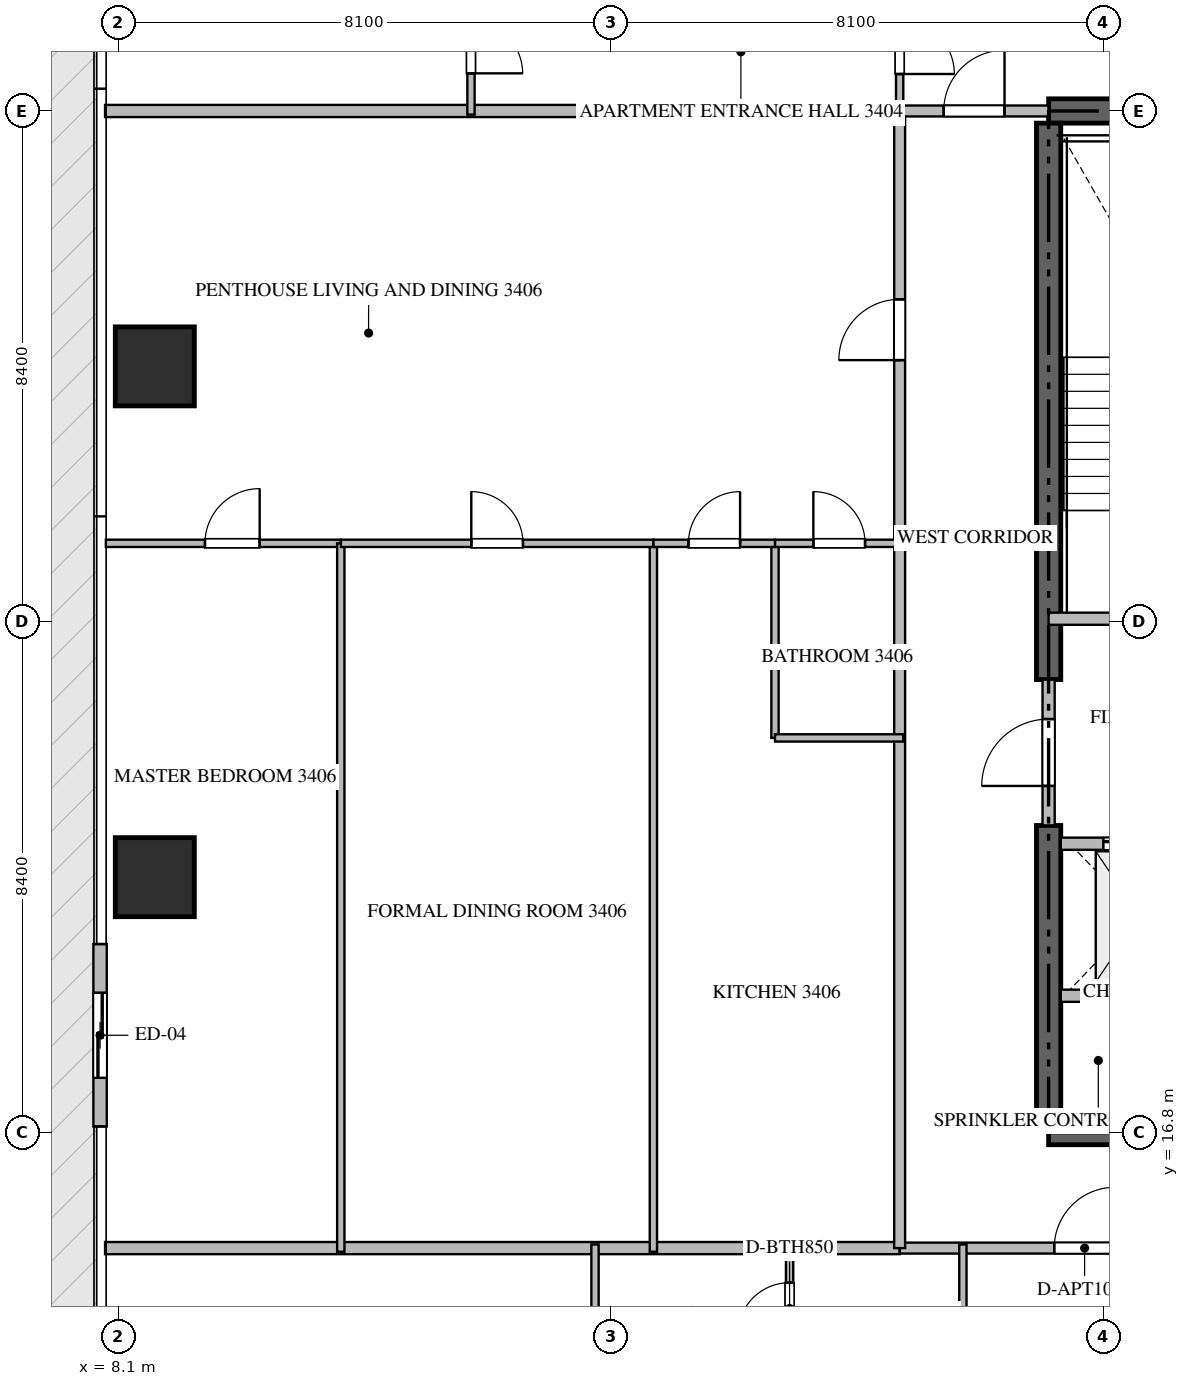
"""IFC4 building model, lengths in metres.
Left out: names, types, materials, properties, quantities, classifications, styles, units other than length and angle.
Written with IfcOpenShell. Run it as: python <this file> out.ifc"""

import sys

from ifc_helpers import new_model, si_unit, direction, frame, frame_2d, origin, origin_2d, place, context, subcontext, project, spatial, rectangle, extrude, source, transform, mapped, element, fill, save


model = new_model("IFC4")
c1 = context("Model", 3, precision=1e-05, world=origin(), true_north=direction((0.0, 1.0)))
c2 = subcontext(c1, "Body", "Model", "MODEL_VIEW")
j1 = project(units=[si_unit("LENGTHUNIT", "METRE"), si_unit("PLANEANGLEUNIT", "RADIAN")], contexts=[c1])
p1 = place(None, origin())
s1 = spatial("IfcSite", under=j1, at=p1, CompositionType="ELEMENT")
p2 = place(p1, origin())
s2 = spatial("IfcBuilding", under=s1, at=p2, CompositionType="ELEMENT")
p3 = place(p2, frame((0.0, 0.0, 138.9)))
s3 = spatial("IfcBuildingStorey", under=s2, at=p3, CompositionType="ELEMENT", Elevation=138.9)
for number, where, z_axis, x_axis in (
    (1, (23.4, 16.8, -0.26), (0.0, 0.0, 1.0), (1.0, 0.0, 0.0)),
    (2, (41.4, 33.6, -0.26), (0.0, 0.0, 1.0), (-1.0, 0.0, 0.0)),
):
    element("IfcWall", number, at=place(p3, frame(where, z_axis=z_axis, x_axis=x_axis)), inside=s3, PredefinedType="SHEAR", context=c2, shape_type="SweptSolid", body=[
        extrude(rectangle(XDim=18.0, YDim=0.4, at=frame_2d((9.0, 0.0))), origin(), (0.0, 0.0, 1.0), 3.748),
    ])
p4 = place(p3, frame((23.4, 17.0, -0.26), z_axis=(0.0, 0.0, 1.0), x_axis=(0.0, 1.0, 0.0)))
e3 = element("IfcWall", 3, at=p4, inside=s3, PredefinedType="SHEAR", context=c2, shape_type="SweptSolid", body=[
    extrude(rectangle(XDim=4.85, YDim=0.4, at=frame_2d((2.425, 0.0))), origin(), (0.0, 0.0, 1.0), 3.748),
])
p5 = place(p3, frame((23.4, 24.25, -0.26), z_axis=(0.0, 0.0, 1.0), x_axis=(0.0, 1.0, 0.0)))
e4 = element("IfcWall", 4, at=p5, inside=s3, PredefinedType="SHEAR", context=c2, shape_type="SweptSolid", body=[
    extrude(rectangle(XDim=9.15, YDim=0.4, at=frame_2d((4.575, 0.0))), origin(), (0.0, 0.0, 1.0), 3.748),
])
m1 = source(origin(), c2, "Body", "SweptSolid", [
    extrude(rectangle(XDim=1.3, YDim=1.3, at=origin_2d()), origin(), (0.0, 0.0, 1.0), 3.75),
])
for number, where, z_axis, x_axis in (
    (5, (8.7, 21.0, -0.26), (0.0, 0.0, 1.0), (1.0, 0.0, 0.0)),
    (6, (8.7, 29.4, -0.26), (0.0, 0.0, 1.0), (1.0, 0.0, 0.0)),
):
    element("IfcColumn", number, at=place(p3, frame(where, z_axis=z_axis, x_axis=x_axis)), inside=s3, PredefinedType="COLUMN", context=c2, shape_type="MappedRepresentation", body=[
        mapped(m1, transform((0.0, 0.0, 0.0), scale=1.0)),
    ])
p6 = place(p3, frame((7.8, 19.9, 0.0), z_axis=(0.0, 0.0, 1.0), x_axis=(0.0, -1.0, 0.0)))
e7 = element("IfcWall", 7, at=p6, inside=s3, PredefinedType="ELEMENTEDWALL", context=c2, shape_type="SweptSolid", body=[
    extrude(rectangle(XDim=3.0, YDim=0.22, at=frame_2d((1.5, 0.0))), origin(), (0.0, 0.0, 1.0), 3.475),
])
p7 = place(p6, frame((0.8, 0.0, 0.0)))
e8 = element("IfcOpeningElement", 8, at=p7, cuts=e7, PredefinedType="OPENING", context=c2, shape_type="SweptSolid", body=[
    extrude(rectangle(XDim=1.4, YDim=2.25, at=frame_2d((0.7, 1.125))), frame((0.0, 0.12, 0.0), z_axis=(0.0, -1.0, 0.0), x_axis=(1.0, 0.0, 0.0)), (0.0, 0.0, 1.0), 0.24),
])
p8 = place(p3, frame((23.4, 25.25, 0.0), z_axis=(0.0, 0.0, 1.0), x_axis=(1.0, 0.0, 0.0)))
e9 = element("IfcWall", 9, at=p8, inside=s3, PredefinedType="STANDARD", context=c2, shape_type="SweptSolid", body=[
    extrude(rectangle(XDim=4.45, YDim=0.2, at=frame_2d((2.225, 0.0))), origin(), (0.0, 0.0, 1.0), 3.49),
])
p9 = place(p8, frame((1.65, 0.0, 0.0)))
e10 = element("IfcOpeningElement", 10, at=p9, cuts=e9, PredefinedType="OPENING", context=c2, shape_type="SweptSolid", body=[
    extrude(rectangle(XDim=1.1, YDim=2.15, at=frame_2d((0.55, 1.075))), frame((0.0, 0.11, 0.0), z_axis=(0.0, -1.0, 0.0), x_axis=(1.0, 0.0, 0.0)), (0.0, 0.0, 1.0), 0.22),
])
p10 = place(p3, frame((23.6, 21.55, 0.0), z_axis=(0.0, 0.0, 1.0), x_axis=(1.0, 0.0, 0.0)))
e11 = element("IfcWall", 11, at=p10, inside=s3, PredefinedType="STANDARD", context=c2, shape_type="SweptSolid", body=[
    extrude(rectangle(XDim=2.45, YDim=0.2, at=frame_2d((1.225, 0.0))), origin(), (0.0, 0.0, 1.0), 3.49),
])
p11 = place(p10, frame((0.7, 0.0, 0.0)))
e12 = element("IfcOpeningElement", 12, at=p11, cuts=e11, PredefinedType="OPENING", context=c2, shape_type="SweptSolid", body=[
    extrude(rectangle(XDim=1.2, YDim=2.2, at=frame_2d((0.6, 1.1))), frame((0.0, 0.11, 0.0), z_axis=(0.0, -1.0, 0.0), x_axis=(1.0, 0.0, 0.0)), (0.0, 0.0, 1.0), 0.22),
])
p12 = place(p3, frame((23.6, 19.05, 0.0), z_axis=(0.0, 0.0, 1.0), x_axis=(1.0, 0.0, 0.0)))
e13 = element("IfcWall", 13, at=p12, inside=s3, PredefinedType="STANDARD", context=c2, shape_type="SweptSolid", body=[
    extrude(rectangle(XDim=2.45, YDim=0.2, at=frame_2d((1.225, 0.0))), origin(), (0.0, 0.0, 1.0), 3.49),
])
p13 = place(p3, frame((23.4, 21.852, 0.0), z_axis=(0.0, 0.0, 1.0), x_axis=(0.0, 1.0, 0.0)))
e14 = element("IfcWall", 14, at=p13, inside=s3, PredefinedType="STANDARD", context=c2, shape_type="SweptSolid", body=[
    extrude(rectangle(XDim=2.396, YDim=0.2, at=frame_2d((1.198, 0.0))), origin(), (0.0, 0.0, 1.0), 3.49),
])
p14 = place(p13, frame((0.648, 0.0, 0.0)))
e15 = element("IfcOpeningElement", 15, at=p14, cuts=e14, PredefinedType="OPENING", context=c2, shape_type="SweptSolid", body=[
    extrude(rectangle(XDim=1.1, YDim=2.15, at=frame_2d((0.55, 1.075))), frame((0.0, 0.11, 0.0), z_axis=(0.0, -1.0, 0.0), x_axis=(1.0, 0.0, 0.0)), (0.0, 0.0, 1.0), 0.22),
])
for number, where, z_axis, x_axis in (
    (16, (7.882, 14.9, 0.0), (0.0, 0.0, 1.0), (1.0, 0.0, 0.0)),
    (17, (7.882, 33.6, 0.0), (0.0, 0.0, 1.0), (1.0, 0.0, 0.0)),
):
    element("IfcWall", number, at=place(p3, frame(where, z_axis=z_axis, x_axis=x_axis)), inside=s3, PredefinedType="PARTITIONING", context=c2, shape_type="SweptSolid", body=[
        extrude(rectangle(XDim=13.068, YDim=0.2, at=frame_2d((6.534, 0.0))), origin(), (0.0, 0.0, 1.0), 3.49),
    ])
p15 = place(p3, frame((20.952, 14.9, 0.0), z_axis=(0.0, 0.0, 1.0), x_axis=(1.0, 0.0, 0.0)))
e18 = element("IfcWall", 18, at=p15, inside=s3, PredefinedType="PARTITIONING", context=c2, shape_type="SweptSolid", body=[
    extrude(rectangle(XDim=22.896, YDim=0.18, at=frame_2d((11.448, 0.0))), origin(), (0.0, 0.0, 1.0), 3.49),
])
p16 = place(p15, frame((2.54, 0.0, 0.0)))
e19 = element("IfcOpeningElement", 19, at=p16, cuts=e18, PredefinedType="OPENING", context=c2, shape_type="SweptSolid", body=[
    extrude(rectangle(XDim=1.0, YDim=2.15, at=frame_2d((0.5, 1.075))), frame((0.0, 0.1, 0.0), z_axis=(0.0, -1.0, 0.0), x_axis=(1.0, 0.0, 0.0)), (0.0, 0.0, 1.0), 0.2),
])
p17 = place(p15, frame((14.911, 0.0, 0.0)))
e20 = element("IfcOpeningElement", 20, at=p17, cuts=e18, PredefinedType="OPENING", context=c2, shape_type="SweptSolid", body=[
    extrude(rectangle(XDim=1.0, YDim=2.15, at=frame_2d((0.5, 1.075))), frame((0.0, 0.1, 0.0), z_axis=(0.0, -1.0, 0.0), x_axis=(1.0, 0.0, 0.0)), (0.0, 0.0, 1.0), 0.2),
])
p18 = place(p15, frame((19.356, 0.0, 0.0)))
e21 = element("IfcOpeningElement", 21, at=p18, cuts=e18, PredefinedType="OPENING", context=c2, shape_type="SweptSolid", body=[
    extrude(rectangle(XDim=1.0, YDim=2.15, at=frame_2d((0.5, 1.075))), frame((0.0, 0.1, 0.0), z_axis=(0.0, -1.0, 0.0), x_axis=(1.0, 0.0, 0.0)), (0.0, 0.0, 1.0), 0.2),
])
p19 = place(p3, frame((20.95, 14.9, 0.0), z_axis=(0.0, 0.0, 1.0), x_axis=(0.0, 1.0, 0.0)))
e22 = element("IfcWall", 22, at=p19, inside=s3, PredefinedType="PARTITIONING", context=c2, shape_type="SweptSolid", body=[
    extrude(rectangle(XDim=18.7, YDim=0.18, at=frame_2d((9.35, 0.0))), origin(), (0.0, 0.0, 1.0), 3.49),
])
p20 = place(p19, frame((14.603, 0.0, 0.0)))
e23 = element("IfcOpeningElement", 23, at=p20, cuts=e22, PredefinedType="OPENING", context=c2, shape_type="SweptSolid", body=[
    extrude(rectangle(XDim=1.0, YDim=2.15, at=frame_2d((0.5, 1.075))), frame((0.0, 0.1, 0.0), z_axis=(0.0, -1.0, 0.0), x_axis=(1.0, 0.0, 0.0)), (0.0, 0.0, 1.0), 0.2),
])
p21 = place(p3, frame((20.952, 33.6, 0.0), z_axis=(0.0, 0.0, 1.0), x_axis=(1.0, 0.0, 0.0)))
e24 = element("IfcWall", 24, at=p21, inside=s3, PredefinedType="PARTITIONING", context=c2, shape_type="SweptSolid", body=[
    extrude(rectangle(XDim=2.446, YDim=0.18, at=frame_2d((1.223, 0.0))), origin(), (0.0, 0.0, 1.0), 3.49),
])
p22 = place(p21, frame((0.723, 0.0, 0.0)))
e25 = element("IfcOpeningElement", 25, at=p22, cuts=e24, PredefinedType="OPENING", context=c2, shape_type="SweptSolid", body=[
    extrude(rectangle(XDim=1.0, YDim=2.15, at=frame_2d((0.5, 1.075))), frame((0.0, 0.1, 0.0), z_axis=(0.0, -1.0, 0.0), x_axis=(1.0, 0.0, 0.0)), (0.0, 0.0, 1.0), 0.2),
])
p23 = place(p3, frame((21.99, 12.15, 0.0), z_axis=(0.0, 0.0, 1.0), x_axis=(0.0, 1.0, 0.0)))
e26 = element("IfcWall", 26, at=p23, inside=s3, PredefinedType="PARTITIONING", context=c2, shape_type="SweptSolid", body=[
    extrude(rectangle(XDim=2.81, YDim=0.12, at=frame_2d((1.405, 0.0))), origin(), (0.0, 0.0, 1.0), 3.49),
])
p24 = place(p3, frame((15.94, 12.85, 0.0), z_axis=(0.0, 0.0, 1.0), x_axis=(0.0, 1.0, 0.0)))
e27 = element("IfcWall", 27, at=p24, inside=s3, PredefinedType="PARTITIONING", context=c2, shape_type="SweptSolid", body=[
    extrude(rectangle(XDim=2.11, YDim=0.12, at=frame_2d((1.055, 0.0))), origin(), (0.0, 0.0, 1.0), 3.49),
])
p25 = place(p3, frame((19.14, 12.852, 0.0), z_axis=(0.0, 0.0, 1.0), x_axis=(0.0, 1.0, 0.0)))
e28 = element("IfcWall", 28, at=p25, inside=s3, PredefinedType="PARTITIONING", context=c2, shape_type="SweptSolid", body=[
    extrude(rectangle(XDim=2.108, YDim=0.12, at=frame_2d((1.054, 0.0))), origin(), (0.0, 0.0, 1.0), 3.49),
])
p26 = place(p25, frame((0.629, 0.0, 0.0)))
e29 = element("IfcOpeningElement", 29, at=p26, cuts=e28, PredefinedType="OPENING", context=c2, shape_type="SweptSolid", body=[
    extrude(rectangle(XDim=0.85, YDim=2.1, at=frame_2d((0.425, 1.05))), frame((0.0, 0.07, 0.0), z_axis=(0.0, -1.0, 0.0), x_axis=(1.0, 0.0, 0.0)), (0.0, 0.0, 1.0), 0.14),
])
p27 = place(p3, frame((20.95, 35.75, 0.0), z_axis=(0.0, 0.0, 1.0), x_axis=(0.0, -1.0, 0.0)))
e30 = element("IfcWall", 30, at=p27, inside=s3, PredefinedType="PARTITIONING", context=c2, shape_type="SweptSolid", body=[
    extrude(rectangle(XDim=2.148, YDim=0.12, at=frame_2d((1.074, 0.0))), origin(), (0.0, 0.0, 1.0), 3.49),
])
p28 = place(p27, frame((0.642, 0.0, 0.0)))
e31 = element("IfcOpeningElement", 31, at=p28, cuts=e30, PredefinedType="OPENING", context=c2, shape_type="SweptSolid", body=[
    extrude(rectangle(XDim=0.9, YDim=2.1, at=frame_2d((0.45, 1.05))), frame((0.0, 0.07, 0.0), z_axis=(0.0, -1.0, 0.0), x_axis=(1.0, 0.0, 0.0)), (0.0, 0.0, 1.0), 0.14),
])
p29 = place(p3, frame((13.9, 35.748, 0.0), z_axis=(0.0, 0.0, 1.0), x_axis=(0.0, -1.0, 0.0)))
e32 = element("IfcWall", 32, at=p29, inside=s3, PredefinedType="PARTITIONING", context=c2, shape_type="SweptSolid", body=[
    extrude(rectangle(XDim=2.208, YDim=0.12, at=frame_2d((1.104, 0.0))), origin(), (0.0, 0.0, 1.0), 3.49),
])
p30 = place(p29, frame((0.679, 0.0, 0.0)))
e33 = element("IfcOpeningElement", 33, at=p30, cuts=e32, PredefinedType="OPENING", context=c2, shape_type="SweptSolid", body=[
    extrude(rectangle(XDim=0.85, YDim=2.1, at=frame_2d((0.425, 1.05))), frame((0.0, 0.07, 0.0), z_axis=(0.0, -1.0, 0.0), x_axis=(1.0, 0.0, 0.0)), (0.0, 0.0, 1.0), 0.14),
])
p31 = place(p3, frame((7.895, 26.49, 0.0), z_axis=(0.0, 0.0, 1.0), x_axis=(1.0, 0.0, 0.0)))
e34 = element("IfcWall", 34, at=p31, inside=s3, PredefinedType="PARTITIONING", context=c2, shape_type="SweptSolid", body=[
    extrude(rectangle(XDim=3.864, YDim=0.12, at=frame_2d((1.932, 0.0))), origin(), (0.0, 0.0, 1.0), 3.49),
])
p32 = place(p31, frame((1.63, 0.0, 0.0)))
e35 = element("IfcOpeningElement", 35, at=p32, cuts=e34, PredefinedType="OPENING", context=c2, shape_type="SweptSolid", body=[
    extrude(rectangle(XDim=0.9, YDim=2.1, at=frame_2d((0.45, 1.05))), frame((0.0, 0.07, 0.0), z_axis=(0.0, -1.0, 0.0), x_axis=(1.0, 0.0, 0.0)), (0.0, 0.0, 1.0), 0.14),
])
p33 = place(p3, frame((11.759, 14.84, 0.0), z_axis=(0.0, 0.0, 1.0), x_axis=(0.0, 1.0, 0.0)))
e36 = element("IfcWall", 36, at=p33, inside=s3, PredefinedType="PARTITIONING", context=c2, shape_type="SweptSolid", body=[
    extrude(rectangle(XDim=11.65, YDim=0.12, at=frame_2d((5.825, 0.0))), origin(), (0.0, 0.0, 1.0), 3.49),
])
p34 = place(p3, frame((16.9, 14.84, 0.0), z_axis=(0.0, 0.0, 1.0), x_axis=(0.0, 1.0, 0.0)))
e37 = element("IfcWall", 37, at=p34, inside=s3, PredefinedType="PARTITIONING", context=c2, shape_type="SweptSolid", body=[
    extrude(rectangle(XDim=11.65, YDim=0.12, at=frame_2d((5.825, 0.0))), origin(), (0.0, 0.0, 1.0), 2.972),
])
p35 = place(p3, frame((18.9, 23.29, 0.0), z_axis=(0.0, 0.0, 1.0), x_axis=(0.0, 1.0, 0.0)))
e38 = element("IfcWall", 38, at=p35, inside=s3, PredefinedType="PARTITIONING", context=c2, shape_type="SweptSolid", body=[
    extrude(rectangle(XDim=3.2, YDim=0.12, at=frame_2d((1.6, 0.0))), origin(), (0.0, 0.0, 1.0), 3.49),
])
p36 = place(p3, frame((18.9, 23.29, 0.0), z_axis=(0.0, 0.0, 1.0), x_axis=(1.0, 0.0, 0.0)))
e39 = element("IfcWall", 39, at=p36, inside=s3, PredefinedType="PARTITIONING", context=c2, shape_type="SweptSolid", body=[
    extrude(rectangle(XDim=2.11, YDim=0.12, at=frame_2d((1.055, 0.0))), origin(), (0.0, 0.0, 1.0), 3.49),
])
p37 = place(p3, frame((11.761, 26.49, 0.0), z_axis=(0.0, 0.0, 1.0), x_axis=(1.0, 0.0, 0.0)))
e40 = element("IfcWall", 40, at=p37, inside=s3, PredefinedType="PARTITIONING", context=c2, shape_type="SweptSolid", body=[
    extrude(rectangle(XDim=5.139, YDim=0.12, at=frame_2d((2.569, 0.0))), origin(), (0.0, 0.0, 1.0), 3.49),
])
p38 = place(p37, frame((2.144, 0.0, 0.0)))
e41 = element("IfcOpeningElement", 41, at=p38, cuts=e40, PredefinedType="OPENING", context=c2, shape_type="SweptSolid", body=[
    extrude(rectangle(XDim=0.85, YDim=2.1, at=frame_2d((0.425, 1.05))), frame((0.0, 0.07, 0.0), z_axis=(0.0, -1.0, 0.0), x_axis=(1.0, 0.0, 0.0)), (0.0, 0.0, 1.0), 0.14),
])
p39 = place(p3, frame((16.902, 26.49, 0.0), z_axis=(0.0, 0.0, 1.0), x_axis=(1.0, 0.0, 0.0)))
e42 = element("IfcWall", 42, at=p39, inside=s3, PredefinedType="PARTITIONING", context=c2, shape_type="SweptSolid", body=[
    extrude(rectangle(XDim=1.998, YDim=0.12, at=frame_2d((0.999, 0.0))), origin(), (0.0, 0.0, 1.0), 3.49),
])
p40 = place(p39, frame((0.574, 0.0, 0.0)))
e43 = element("IfcOpeningElement", 43, at=p40, cuts=e42, PredefinedType="OPENING", context=c2, shape_type="SweptSolid", body=[
    extrude(rectangle(XDim=0.85, YDim=2.1, at=frame_2d((0.425, 1.05))), frame((0.0, 0.07, 0.0), z_axis=(0.0, -1.0, 0.0), x_axis=(1.0, 0.0, 0.0)), (0.0, 0.0, 1.0), 0.14),
])
p41 = place(p3, frame((18.902, 26.49, 0.0), z_axis=(0.0, 0.0, 1.0), x_axis=(1.0, 0.0, 0.0)))
e44 = element("IfcWall", 44, at=p41, inside=s3, PredefinedType="PARTITIONING", context=c2, shape_type="SweptSolid", body=[
    extrude(rectangle(XDim=2.108, YDim=0.12, at=frame_2d((1.054, 0.0))), origin(), (0.0, 0.0, 1.0), 3.49),
])
p42 = place(p41, frame((0.629, 0.0, 0.0)))
e45 = element("IfcOpeningElement", 45, at=p42, cuts=e44, PredefinedType="OPENING", context=c2, shape_type="SweptSolid", body=[
    extrude(rectangle(XDim=0.85, YDim=2.1, at=frame_2d((0.425, 1.05))), frame((0.0, 0.07, 0.0), z_axis=(0.0, -1.0, 0.0), x_axis=(1.0, 0.0, 0.0)), (0.0, 0.0, 1.0), 0.14),
])
m2 = source(origin(), c2, "Body", "SweptSolid", [
    extrude(rectangle(XDim=1.4, YDim=2.25, at=frame_2d((0.7, 1.125))), frame((0.0, 0.025, 0.0), z_axis=(0.0, -1.0, 0.0), x_axis=(1.0, 0.0, 0.0)), (0.0, 0.0, 1.0), 0.05),
])
p43 = place(p7, origin())
e46 = element("IfcDoor", 46, at=p43, inside=s3, OperationType="SLIDING_TO_LEFT", PredefinedType="DOOR", context=c2, shape_type="MappedRepresentation", body=[
    mapped(m2, transform((0.0, 0.0, 0.0), scale=1.0)),
])
fill(e8, e46)
m3 = source(origin(), c2, "Body", "SweptSolid", [
    extrude(rectangle(XDim=1.2, YDim=2.2, at=frame_2d((0.6, 1.1))), frame((0.0, 0.025, 0.0), z_axis=(0.0, -1.0, 0.0), x_axis=(1.0, 0.0, 0.0)), (0.0, 0.0, 1.0), 0.05),
])
p44 = place(p11, origin())
e47 = element("IfcDoor", 47, at=p44, inside=s3, OperationType="DOUBLE_DOOR_SLIDING", PredefinedType="DOOR", context=c2, shape_type="MappedRepresentation", body=[
    mapped(m3, transform((0.0, 0.0, 0.0), scale=1.0)),
])
fill(e12, e47)
m4 = source(origin(), c2, "Body", "SweptSolid", [
    extrude(rectangle(XDim=1.1, YDim=2.15, at=frame_2d((0.55, 1.075))), frame((0.0, 0.025, 0.0), z_axis=(0.0, -1.0, 0.0), x_axis=(1.0, 0.0, 0.0)), (0.0, 0.0, 1.0), 0.05),
])
p45 = place(p14, origin())
e48 = element("IfcDoor", 48, at=p45, inside=s3, OperationType="SINGLE_SWING_LEFT", PredefinedType="DOOR", context=c2, shape_type="MappedRepresentation", body=[
    mapped(m4, transform((0.0, 0.0, 0.0), scale=1.0)),
])
fill(e15, e48)
m5 = source(origin(), c2, "Body", "SweptSolid", [
    extrude(rectangle(XDim=1.0, YDim=2.15, at=frame_2d((0.5, 1.075))), frame((0.0, 0.025, 0.0), z_axis=(0.0, -1.0, 0.0), x_axis=(1.0, 0.0, 0.0)), (0.0, 0.0, 1.0), 0.05),
])
p46 = place(p16, origin())
e49 = element("IfcDoor", 49, at=p46, inside=s3, OperationType="SINGLE_SWING_RIGHT", PredefinedType="DOOR", context=c2, shape_type="MappedRepresentation", body=[
    mapped(m5, transform((0.0, 0.0, 0.0), scale=1.0)),
])
fill(e19, e49)
p47 = place(p20, origin())
e50 = element("IfcDoor", 50, at=p47, inside=s3, OperationType="SINGLE_SWING_LEFT", PredefinedType="DOOR", context=c2, shape_type="MappedRepresentation", body=[
    mapped(m5, transform((0.0, 0.0, 0.0), scale=1.0)),
])
fill(e23, e50)
p48 = place(p22, origin())
e51 = element("IfcDoor", 51, at=p48, inside=s3, OperationType="SINGLE_SWING_RIGHT", PredefinedType="DOOR", context=c2, shape_type="MappedRepresentation", body=[
    mapped(m5, transform((0.0, 0.0, 0.0), scale=1.0)),
])
fill(e25, e51)
m6 = source(origin(), c2, "Body", "SweptSolid", [
    extrude(rectangle(XDim=0.85, YDim=2.1, at=frame_2d((0.425, 1.05))), frame((0.0, 0.025, 0.0), z_axis=(0.0, -1.0, 0.0), x_axis=(1.0, 0.0, 0.0)), (0.0, 0.0, 1.0), 0.05),
])
p49 = place(p26, origin())
e52 = element("IfcDoor", 52, at=p49, inside=s3, OperationType="SINGLE_SWING_LEFT", PredefinedType="DOOR", context=c2, shape_type="MappedRepresentation", body=[
    mapped(m6, transform((0.0, 0.0, 0.0), scale=1.0)),
])
fill(e29, e52)
m7 = source(origin(), c2, "Body", "SweptSolid", [
    extrude(rectangle(XDim=0.9, YDim=2.1, at=frame_2d((0.45, 1.05))), frame((0.0, 0.025, 0.0), z_axis=(0.0, -1.0, 0.0), x_axis=(1.0, 0.0, 0.0)), (0.0, 0.0, 1.0), 0.05),
])
p50 = place(p28, origin())
e53 = element("IfcDoor", 53, at=p50, inside=s3, OperationType="SINGLE_SWING_RIGHT", PredefinedType="DOOR", context=c2, shape_type="MappedRepresentation", body=[
    mapped(m7, transform((0.0, 0.0, 0.0), scale=1.0)),
])
fill(e31, e53)
p51 = place(p30, origin())
e54 = element("IfcDoor", 54, at=p51, inside=s3, OperationType="SINGLE_SWING_RIGHT", PredefinedType="DOOR", context=c2, shape_type="MappedRepresentation", body=[
    mapped(m6, transform((0.0, 0.0, 0.0), scale=1.0)),
])
fill(e33, e54)
p52 = place(p32, origin())
e55 = element("IfcDoor", 55, at=p52, inside=s3, OperationType="SINGLE_SWING_RIGHT", PredefinedType="DOOR", context=c2, shape_type="MappedRepresentation", body=[
    mapped(m7, transform((0.0, 0.0, 0.0), scale=1.0)),
])
fill(e35, e55)
p53 = place(p38, origin())
e56 = element("IfcDoor", 56, at=p53, inside=s3, OperationType="SINGLE_SWING_LEFT", PredefinedType="DOOR", context=c2, shape_type="MappedRepresentation", body=[
    mapped(m6, transform((0.0, 0.0, 0.0), scale=1.0)),
])
fill(e41, e56)
p54 = place(p40, origin())
e57 = element("IfcDoor", 57, at=p54, inside=s3, OperationType="SINGLE_SWING_RIGHT", PredefinedType="DOOR", context=c2, shape_type="MappedRepresentation", body=[
    mapped(m6, transform((0.0, 0.0, 0.0), scale=1.0)),
])
fill(e43, e57)
p55 = place(p42, origin())
e58 = element("IfcDoor", 58, at=p55, inside=s3, OperationType="SINGLE_SWING_LEFT", PredefinedType="DOOR", context=c2, shape_type="MappedRepresentation", body=[
    mapped(m6, transform((0.0, 0.0, 0.0), scale=1.0)),
])
fill(e45, e58)
save(model, sys.argv[1])
